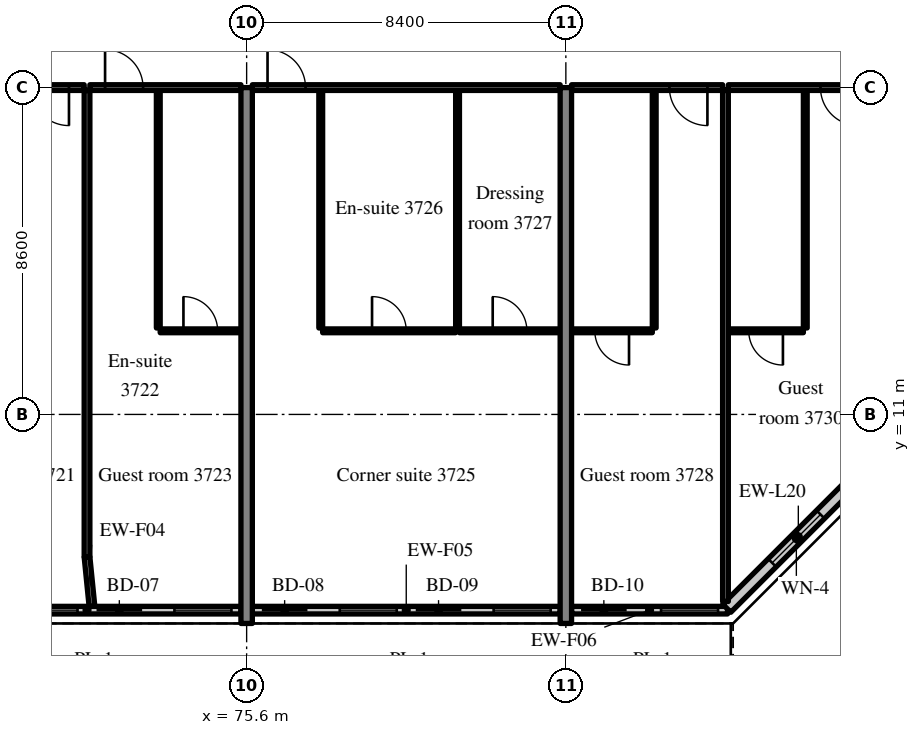
"""IFC4 building model, lengths in metres.
Left out: names, types, materials, properties, quantities, classifications, styles, units other than length and angle.
Written with IfcOpenShell. Run it as: python <this file> out.ifc"""

import sys

from ifc_helpers import new_model, si_unit, direction, frame, frame_2d, origin, place, context, subcontext, project, spatial, rectangle, extrude, source, transform, mapped, element, fill, save


model = new_model("IFC4")
c1 = context("Model", 3, precision=1e-05, world=origin(), true_north=direction((0.0, 1.0)))
c2 = subcontext(c1, "Body", "Model", "MODEL_VIEW")
j1 = project(units=[si_unit("LENGTHUNIT", "METRE"), si_unit("PLANEANGLEUNIT", "RADIAN")], contexts=[c1])
p1 = place(None, origin())
s1 = spatial("IfcSite", under=j1, at=p1, CompositionType="ELEMENT")
p2 = place(p1, origin())
s2 = spatial("IfcBuilding", under=s1, at=p2, CompositionType="ELEMENT")
p3 = place(p2, frame((0.0, 0.0, 155.4)))
s3 = spatial("IfcBuildingStorey", under=s2, at=p3, CompositionType="ELEMENT", Elevation=155.4)
m1 = source(origin(), c2, "Body", "SweptSolid", [
    extrude(rectangle(XDim=14.1, YDim=0.3, at=frame_2d((7.05, 0.0))), origin(), (0.0, 0.0, 1.0), 3.52),
])
for number, where, z_axis, x_axis in (
    (1, (75.6, 5.5, 0.0), (0.0, 0.0, 1.0), (0.0, 1.0, 0.0)),
    (2, (84.0, 5.5, 0.0), (0.0, 0.0, 1.0), (0.0, 1.0, 0.0)),
):
    element("IfcWall", number, at=place(p3, frame(where, z_axis=z_axis, x_axis=x_axis)), inside=s3, PredefinedType="SHEAR", context=c2, shape_type="MappedRepresentation", body=[
        mapped(m1, transform((0.0, 0.0, 0.0), scale=1.0)),
    ])
m2 = source(origin(), c2, "Body", "SweptSolid", [
    extrude(rectangle(XDim=8.1, YDim=0.2, at=frame_2d((4.05, 0.0))), origin(), (0.0, 0.0, 1.0), 2.87),
])
p4 = place(p3, frame((67.35, 5.85, 0.0), z_axis=(0.0, 0.0, 1.0), x_axis=(1.0, 0.0, 0.0)))
e3 = element("IfcWall", 3, at=p4, inside=s3, PredefinedType="SOLIDWALL", context=c2, shape_type="MappedRepresentation", body=[
    mapped(m2, transform((0.0, 0.0, 0.0), scale=1.0)),
])
m3 = source(origin(), c2, "Body", "SweptSolid", [
    extrude(rectangle(XDim=1.2, YDim=2.4, at=frame_2d((0.6, 1.2))), frame((0.0, 0.11, 0.0), z_axis=(0.0, -1.0, 0.0), x_axis=(1.0, 0.0, 0.0)), (0.0, 0.0, 1.0), 0.22),
])
p5 = place(p4, frame((0.25, 0.0, 0.0)))
e4 = element("IfcOpeningElement", 4, at=p5, cuts=e3, PredefinedType="OPENING", context=c2, shape_type="MappedRepresentation", body=[
    mapped(m3, transform((0.0, 0.0, 0.0), scale=1.0)),
])
m4 = source(origin(), c2, "Body", "SweptSolid", [
    extrude(rectangle(XDim=1.5, YDim=1.5, at=frame_2d((0.75, 0.75))), frame((0.0, 0.11, 0.0), z_axis=(0.0, -1.0, 0.0), x_axis=(1.0, 0.0, 0.0)), (0.0, 0.0, 1.0), 0.22),
])
p6 = place(p4, frame((2.3, 0.0, 0.9)))
e5 = element("IfcOpeningElement", 5, at=p6, cuts=e3, PredefinedType="OPENING", context=c2, shape_type="MappedRepresentation", body=[
    mapped(m4, transform((0.0, 0.0, 0.0), scale=1.0)),
])
p7 = place(p4, frame((4.3, 0.0, 0.0)))
e6 = element("IfcOpeningElement", 6, at=p7, cuts=e3, PredefinedType="OPENING", context=c2, shape_type="MappedRepresentation", body=[
    mapped(m3, transform((0.0, 0.0, 0.0), scale=1.0)),
])
p8 = place(p4, frame((6.35, 0.0, 0.9)))
e7 = element("IfcOpeningElement", 7, at=p8, cuts=e3, PredefinedType="OPENING", context=c2, shape_type="MappedRepresentation", body=[
    mapped(m4, transform((0.0, 0.0, 0.0), scale=1.0)),
])
m5 = source(origin(), c2, "Body", "SweptSolid", [
    extrude(rectangle(XDim=8.1, YDim=0.2, at=frame_2d((4.05, 0.0))), origin(), (0.0, 0.0, 1.0), 2.87),
])
p9 = place(p3, frame((75.75, 5.85, 0.0), z_axis=(0.0, 0.0, 1.0), x_axis=(1.0, 0.0, 0.0)))
e8 = element("IfcWall", 8, at=p9, inside=s3, PredefinedType="SOLIDWALL", context=c2, shape_type="MappedRepresentation", body=[
    mapped(m5, transform((0.0, 0.0, 0.0), scale=1.0)),
])
p10 = place(p9, frame((0.25, 0.0, 0.0)))
e9 = element("IfcOpeningElement", 9, at=p10, cuts=e8, PredefinedType="OPENING", context=c2, shape_type="MappedRepresentation", body=[
    mapped(m3, transform((0.0, 0.0, 0.0), scale=1.0)),
])
p11 = place(p9, frame((2.3, 0.0, 0.9)))
e10 = element("IfcOpeningElement", 10, at=p11, cuts=e8, PredefinedType="OPENING", context=c2, shape_type="MappedRepresentation", body=[
    mapped(m4, transform((0.0, 0.0, 0.0), scale=1.0)),
])
p12 = place(p9, frame((4.3, 0.0, 0.0)))
e11 = element("IfcOpeningElement", 11, at=p12, cuts=e8, PredefinedType="OPENING", context=c2, shape_type="MappedRepresentation", body=[
    mapped(m3, transform((0.0, 0.0, 0.0), scale=1.0)),
])
p13 = place(p9, frame((6.35, 0.0, 0.9)))
e12 = element("IfcOpeningElement", 12, at=p13, cuts=e8, PredefinedType="OPENING", context=c2, shape_type="MappedRepresentation", body=[
    mapped(m4, transform((0.0, 0.0, 0.0), scale=1.0)),
])
m6 = source(origin(), c2, "Body", "SweptSolid", [
    extrude(rectangle(XDim=4.105, YDim=0.2, at=frame_2d((2.052, 0.0))), origin(), (0.0, 0.0, 1.0), 2.87),
])
p14 = place(p3, frame((84.15, 5.85, 0.0), z_axis=(0.0, 0.0, 1.0), x_axis=(1.0, 0.0, 0.0)))
e13 = element("IfcWall", 13, at=p14, inside=s3, PredefinedType="SOLIDWALL", context=c2, shape_type="MappedRepresentation", body=[
    mapped(m6, transform((0.0, 0.0, 0.0), scale=1.0)),
])
p15 = place(p14, frame((0.25, 0.0, 0.0)))
e14 = element("IfcOpeningElement", 14, at=p15, cuts=e13, PredefinedType="OPENING", context=c2, shape_type="MappedRepresentation", body=[
    mapped(m3, transform((0.0, 0.0, 0.0), scale=1.0)),
])
p16 = place(p14, frame((2.355, 0.0, 0.9)))
e15 = element("IfcOpeningElement", 15, at=p16, cuts=e13, PredefinedType="OPENING", context=c2, shape_type="MappedRepresentation", body=[
    mapped(m4, transform((0.0, 0.0, 0.0), scale=1.0)),
])
m7 = source(origin(), c2, "Body", "SweptSolid", [
    extrude(rectangle(XDim=5.326, YDim=0.3, at=frame_2d((2.663, 0.0))), origin(), (0.0, 0.0, 1.0), 3.52),
])
p17 = place(p3, frame((88.234, 5.9, 0.0), z_axis=(0.0, 0.0, 1.0), x_axis=(0.707083859269, 0.707129702361, 0.0)))
e16 = element("IfcWall", 16, at=p17, inside=s3, PredefinedType="SOLIDWALL", context=c2, shape_type="MappedRepresentation", body=[
    mapped(m7, transform((0.0, 0.0, 0.0), scale=1.0)),
])
m8 = source(origin(), c2, "Body", "SweptSolid", [
    extrude(rectangle(XDim=1.8, YDim=1.5, at=frame_2d((0.9, 0.75))), frame((0.0, 0.16, 0.0), z_axis=(0.0, -1.0, 0.0), x_axis=(1.0, 0.0, 0.0)), (0.0, 0.0, 1.0), 0.32),
])
p18 = place(p17, frame((1.689, 0.0, 0.9)))
e17 = element("IfcOpeningElement", 17, at=p18, cuts=e16, PredefinedType="OPENING", context=c2, shape_type="MappedRepresentation", body=[
    mapped(m8, transform((0.0, 0.0, 0.0), scale=1.0)),
])
m9 = source(origin(), c2, "Body", "SweptSolid", [
    extrude(rectangle(XDim=3.975, YDim=0.15, at=frame_2d((1.987, 0.0))), origin(), (0.0, 0.0, 1.0), 2.82),
])
p19 = place(p3, frame((67.35, 19.6, 0.0), z_axis=(0.0, 0.0, 1.0), x_axis=(1.0, 0.0, 0.0)))
e18 = element("IfcWall", 18, at=p19, inside=s3, PredefinedType="PARTITIONING", context=c2, shape_type="MappedRepresentation", body=[
    mapped(m9, transform((0.0, 0.0, 0.0), scale=1.0)),
])
m10 = source(origin(), c2, "Body", "SweptSolid", [
    extrude(rectangle(XDim=1.0, YDim=2.1, at=frame_2d((0.5, 1.05))), frame((0.0, 0.085, 0.0), z_axis=(0.0, -1.0, 0.0), x_axis=(1.0, 0.0, 0.0)), (0.0, 0.0, 1.0), 0.17),
])
p20 = place(p19, frame((2.575, 0.0, 0.0)))
e19 = element("IfcOpeningElement", 19, at=p20, cuts=e18, PredefinedType="OPENING", context=c2, shape_type="MappedRepresentation", body=[
    mapped(m10, transform((0.0, 0.0, 0.0), scale=1.0)),
])
m11 = source(origin(), c2, "Body", "SweptSolid", [
    extrude(rectangle(XDim=6.25, YDim=0.1, at=frame_2d((3.125, 0.0))), origin(), (0.0, 0.0, 1.0), 3.52),
])
p21 = place(p3, frame((73.275, 13.275, 0.0), z_axis=(0.0, 0.0, 1.0), x_axis=(0.0, 1.0, 0.0)))
e20 = element("IfcWall", 20, at=p21, inside=s3, PredefinedType="PARTITIONING", context=c2, shape_type="MappedRepresentation", body=[
    mapped(m11, transform((0.0, 0.0, 0.0), scale=1.0)),
])
m12 = source(origin(), c2, "Body", "SweptSolid", [
    extrude(rectangle(XDim=2.125, YDim=0.1, at=frame_2d((1.062, 0.0))), origin(), (0.0, 0.0, 1.0), 3.52),
])
p22 = place(p3, frame((73.325, 13.2, 0.0), z_axis=(0.0, 0.0, 1.0), x_axis=(1.0, 0.0, 0.0)))
e21 = element("IfcWall", 21, at=p22, inside=s3, PredefinedType="PARTITIONING", context=c2, shape_type="MappedRepresentation", body=[
    mapped(m12, transform((0.0, 0.0, 0.0), scale=1.0)),
])
m13 = source(origin(), c2, "Body", "SweptSolid", [
    extrude(rectangle(XDim=0.9, YDim=2.1, at=frame_2d((0.45, 1.05))), frame((0.0, 0.06, 0.0), z_axis=(0.0, -1.0, 0.0), x_axis=(1.0, 0.0, 0.0)), (0.0, 0.0, 1.0), 0.12),
])
p23 = place(p22, frame((0.612, 0.0, 0.0)))
e22 = element("IfcOpeningElement", 22, at=p23, cuts=e21, PredefinedType="OPENING", context=c2, shape_type="MappedRepresentation", body=[
    mapped(m13, transform((0.0, 0.0, 0.0), scale=1.0)),
])
p24 = place(p3, frame((71.475, 19.6, 0.0), z_axis=(0.0, 0.0, 1.0), x_axis=(1.0, 0.0, 0.0)))
e23 = element("IfcWall", 23, at=p24, inside=s3, PredefinedType="PARTITIONING", context=c2, shape_type="MappedRepresentation", body=[
    mapped(m9, transform((0.0, 0.0, 0.0), scale=1.0)),
])
p25 = place(p24, frame((0.4, 0.0, 0.0)))
e24 = element("IfcOpeningElement", 24, at=p25, cuts=e23, PredefinedType="OPENING", context=c2, shape_type="MappedRepresentation", body=[
    mapped(m10, transform((0.0, 0.0, 0.0), scale=1.0)),
])
m14 = source(origin(), c2, "Body", "SweptSolid", [
    extrude(rectangle(XDim=12.275, YDim=0.15, at=frame_2d((6.137, 0.0))), origin(), (0.0, 0.0, 1.0), 3.52),
])
p26 = place(p3, frame((71.4, 7.25, 0.0), z_axis=(0.0, 0.0, 1.0), x_axis=(0.0, 1.0, 0.0)))
e25 = element("IfcWall", 25, at=p26, inside=s3, PredefinedType="PARTITIONING", context=c2, shape_type="MappedRepresentation", body=[
    mapped(m14, transform((0.0, 0.0, 0.0), scale=1.0)),
])
for number, where, z_axis, x_axis in (
    (26, (77.55, 13.275, 0.0), (0.0, 0.0, 1.0), (0.0, 1.0, 0.0)),
    (27, (81.15, 13.275, 0.0), (0.0, 0.0, 1.0), (0.0, 1.0, 0.0)),
):
    element("IfcWall", number, at=place(p3, frame(where, z_axis=z_axis, x_axis=x_axis)), inside=s3, PredefinedType="PARTITIONING", context=c2, shape_type="MappedRepresentation", body=[
        mapped(m11, transform((0.0, 0.0, 0.0), scale=1.0)),
    ])
m15 = source(origin(), c2, "Body", "SweptSolid", [
    extrude(rectangle(XDim=3.5, YDim=0.1, at=frame_2d((1.75, 0.0))), origin(), (0.0, 0.0, 1.0), 3.52),
])
p27 = place(p3, frame((77.6, 13.2, 0.0), z_axis=(0.0, 0.0, 1.0), x_axis=(1.0, 0.0, 0.0)))
e28 = element("IfcWall", 28, at=p27, inside=s3, PredefinedType="PARTITIONING", context=c2, shape_type="MappedRepresentation", body=[
    mapped(m15, transform((0.0, 0.0, 0.0), scale=1.0)),
])
p28 = place(p27, frame((1.3, 0.0, 0.0)))
e29 = element("IfcOpeningElement", 29, at=p28, cuts=e28, PredefinedType="OPENING", context=c2, shape_type="MappedRepresentation", body=[
    mapped(m13, transform((0.0, 0.0, 0.0), scale=1.0)),
])
m16 = source(origin(), c2, "Body", "SweptSolid", [
    extrude(rectangle(XDim=2.65, YDim=0.1, at=frame_2d((1.325, 0.0))), origin(), (0.0, 0.0, 1.0), 3.52),
])
p29 = place(p3, frame((81.2, 13.2, 0.0), z_axis=(0.0, 0.0, 1.0), x_axis=(1.0, 0.0, 0.0)))
e30 = element("IfcWall", 30, at=p29, inside=s3, PredefinedType="PARTITIONING", context=c2, shape_type="MappedRepresentation", body=[
    mapped(m16, transform((0.0, 0.0, 0.0), scale=1.0)),
])
p30 = place(p29, frame((0.875, 0.0, 0.0)))
e31 = element("IfcOpeningElement", 31, at=p30, cuts=e30, PredefinedType="OPENING", context=c2, shape_type="MappedRepresentation", body=[
    mapped(m13, transform((0.0, 0.0, 0.0), scale=1.0)),
])
m17 = source(origin(), c2, "Body", "SweptSolid", [
    extrude(rectangle(XDim=8.1, YDim=0.15, at=frame_2d((4.05, 0.0))), origin(), (0.0, 0.0, 1.0), 2.82),
])
p31 = place(p3, frame((75.75, 19.6, 0.0), z_axis=(0.0, 0.0, 1.0), x_axis=(1.0, 0.0, 0.0)))
e32 = element("IfcWall", 32, at=p31, inside=s3, PredefinedType="PARTITIONING", context=c2, shape_type="MappedRepresentation", body=[
    mapped(m17, transform((0.0, 0.0, 0.0), scale=1.0)),
])
p32 = place(p31, frame((0.4, 0.0, 0.0)))
e33 = element("IfcOpeningElement", 33, at=p32, cuts=e32, PredefinedType="OPENING", context=c2, shape_type="MappedRepresentation", body=[
    mapped(m10, transform((0.0, 0.0, 0.0), scale=1.0)),
])
p33 = place(p3, frame((86.325, 13.275, 0.0), z_axis=(0.0, 0.0, 1.0), x_axis=(0.0, 1.0, 0.0)))
e34 = element("IfcWall", 34, at=p33, inside=s3, PredefinedType="PARTITIONING", context=c2, shape_type="MappedRepresentation", body=[
    mapped(m11, transform((0.0, 0.0, 0.0), scale=1.0)),
])
p34 = place(p3, frame((84.15, 13.2, 0.0), z_axis=(0.0, 0.0, 1.0), x_axis=(1.0, 0.0, 0.0)))
e35 = element("IfcWall", 35, at=p34, inside=s3, PredefinedType="PARTITIONING", context=c2, shape_type="MappedRepresentation", body=[
    mapped(m12, transform((0.0, 0.0, 0.0), scale=1.0)),
])
p35 = place(p34, frame((0.612, 0.0, 0.0)))
e36 = element("IfcOpeningElement", 36, at=p35, cuts=e35, PredefinedType="OPENING", context=c2, shape_type="MappedRepresentation", body=[
    mapped(m13, transform((0.0, 0.0, 0.0), scale=1.0)),
])
m18 = source(origin(), c2, "Body", "SweptSolid", [
    extrude(rectangle(XDim=3.975, YDim=0.15, at=frame_2d((1.988, 0.0))), origin(), (0.0, 0.0, 1.0), 2.82),
])
p36 = place(p3, frame((84.15, 19.6, 0.0), z_axis=(0.0, 0.0, 1.0), x_axis=(1.0, 0.0, 0.0)))
e37 = element("IfcWall", 37, at=p36, inside=s3, PredefinedType="PARTITIONING", context=c2, shape_type="MappedRepresentation", body=[
    mapped(m18, transform((0.0, 0.0, 0.0), scale=1.0)),
])
p37 = place(p36, frame((2.575, 0.0, 0.0)))
e38 = element("IfcOpeningElement", 38, at=p37, cuts=e37, PredefinedType="OPENING", context=c2, shape_type="MappedRepresentation", body=[
    mapped(m10, transform((0.0, 0.0, 0.0), scale=1.0)),
])
p38 = place(p3, frame((90.3, 13.275, 0.0), z_axis=(0.0, 0.0, 1.0), x_axis=(0.0, 1.0, 0.0)))
e39 = element("IfcWall", 39, at=p38, inside=s3, PredefinedType="PARTITIONING", context=c2, shape_type="MappedRepresentation", body=[
    mapped(m11, transform((0.0, 0.0, 0.0), scale=1.0)),
])
m19 = source(origin(), c2, "Body", "SweptSolid", [
    extrude(rectangle(XDim=1.975, YDim=0.1, at=frame_2d((0.988, 0.0))), origin(), (0.0, 0.0, 1.0), 3.52),
])
p39 = place(p3, frame((88.275, 13.2, 0.0), z_axis=(0.0, 0.0, 1.0), x_axis=(1.0, 0.0, 0.0)))
e40 = element("IfcWall", 40, at=p39, inside=s3, PredefinedType="PARTITIONING", context=c2, shape_type="MappedRepresentation", body=[
    mapped(m19, transform((0.0, 0.0, 0.0), scale=1.0)),
])
p40 = place(p39, frame((0.537, 0.0, 0.0)))
e41 = element("IfcOpeningElement", 41, at=p40, cuts=e40, PredefinedType="OPENING", context=c2, shape_type="MappedRepresentation", body=[
    mapped(m13, transform((0.0, 0.0, 0.0), scale=1.0)),
])
m20 = source(origin(), c2, "Body", "SweptSolid", [
    extrude(rectangle(XDim=3.825, YDim=0.15, at=frame_2d((1.913, 0.0))), origin(), (0.0, 0.0, 1.0), 2.82),
])
p41 = place(p3, frame((88.275, 19.6, 0.0), z_axis=(0.0, 0.0, 1.0), x_axis=(1.0, 0.0, 0.0)))
e42 = element("IfcWall", 42, at=p41, inside=s3, PredefinedType="PARTITIONING", context=c2, shape_type="MappedRepresentation", body=[
    mapped(m20, transform((0.0, 0.0, 0.0), scale=1.0)),
])
p42 = place(p41, frame((2.425, 0.0, 0.0)))
e43 = element("IfcOpeningElement", 43, at=p42, cuts=e42, PredefinedType="OPENING", context=c2, shape_type="MappedRepresentation", body=[
    mapped(m10, transform((0.0, 0.0, 0.0), scale=1.0)),
])
m21 = source(origin(), c2, "Body", "SweptSolid", [
    extrude(rectangle(XDim=13.447, YDim=0.15, at=frame_2d((6.724, 0.0))), origin(), (0.0, 0.0, 1.0), 3.52),
])
p43 = place(p3, frame((88.2, 6.078, 0.0), z_axis=(0.0, 0.0, 1.0), x_axis=(0.0, 1.0, 0.0)))
e44 = element("IfcWall", 44, at=p43, inside=s3, PredefinedType="PARTITIONING", context=c2, shape_type="MappedRepresentation", body=[
    mapped(m21, transform((0.0, 0.0, 0.0), scale=1.0)),
])
m22 = source(origin(), c2, "Body", "SweptSolid", [
    extrude(rectangle(XDim=1.307, YDim=0.15, at=frame_2d((0.653, 0.0))), origin(), (0.0, 0.0, 1.0), 3.52),
])
p44 = place(p3, frame((71.53, 5.95, 0.0), z_axis=(0.0, 0.0, 1.0), x_axis=(-0.099596223396, 0.99502793543, 0.0)))
e45 = element("IfcWall", 45, at=p44, inside=s3, PredefinedType="PARTITIONING", context=c2, shape_type="MappedRepresentation", body=[
    mapped(m22, transform((0.0, 0.0, 0.0), scale=1.0)),
])
m23 = source(origin(), c2, "Body", "SweptSolid", [
    extrude(rectangle(XDim=1.5, YDim=1.5, at=frame_2d((0.75, 0.75))), frame((0.0, 0.03, 0.0), z_axis=(0.0, -1.0, 0.0), x_axis=(1.0, 0.0, 0.0)), (0.0, 0.0, 1.0), 0.06),
])
p45 = place(p6, origin())
e46 = element("IfcWindow", 46, at=p45, inside=s3, PartitioningType="SINGLE_PANEL", PredefinedType="WINDOW", context=c2, shape_type="MappedRepresentation", body=[
    mapped(m23, transform((0.0, 0.0, 0.0), scale=1.0)),
])
fill(e5, e46)
m24 = source(origin(), c2, "Body", "SweptSolid", [
    extrude(rectangle(XDim=1.2, YDim=2.4, at=frame_2d((0.6, 1.2))), frame((0.0, 0.025, 0.0), z_axis=(0.0, -1.0, 0.0), x_axis=(1.0, 0.0, 0.0)), (0.0, 0.0, 1.0), 0.05),
])
p46 = place(p7, origin())
e47 = element("IfcDoor", 47, at=p46, inside=s3, OperationType="SLIDING_TO_LEFT", PredefinedType="DOOR", context=c2, shape_type="MappedRepresentation", body=[
    mapped(m24, transform((0.0, 0.0, 0.0), scale=1.0)),
])
fill(e6, e47)
p47 = place(p8, origin())
e48 = element("IfcWindow", 48, at=p47, inside=s3, PartitioningType="SINGLE_PANEL", PredefinedType="WINDOW", context=c2, shape_type="MappedRepresentation", body=[
    mapped(m23, transform((0.0, 0.0, 0.0), scale=1.0)),
])
fill(e7, e48)
p48 = place(p10, origin())
e49 = element("IfcDoor", 49, at=p48, inside=s3, OperationType="SLIDING_TO_RIGHT", PredefinedType="DOOR", context=c2, shape_type="MappedRepresentation", body=[
    mapped(m24, transform((0.0, 0.0, 0.0), scale=1.0)),
])
fill(e9, e49)
p49 = place(p11, origin())
e50 = element("IfcWindow", 50, at=p49, inside=s3, PartitioningType="SINGLE_PANEL", PredefinedType="WINDOW", context=c2, shape_type="MappedRepresentation", body=[
    mapped(m23, transform((0.0, 0.0, 0.0), scale=1.0)),
])
fill(e10, e50)
p50 = place(p12, origin())
e51 = element("IfcDoor", 51, at=p50, inside=s3, OperationType="SLIDING_TO_LEFT", PredefinedType="DOOR", context=c2, shape_type="MappedRepresentation", body=[
    mapped(m24, transform((0.0, 0.0, 0.0), scale=1.0)),
])
fill(e11, e51)
p51 = place(p13, origin())
e52 = element("IfcWindow", 52, at=p51, inside=s3, PartitioningType="SINGLE_PANEL", PredefinedType="WINDOW", context=c2, shape_type="MappedRepresentation", body=[
    mapped(m23, transform((0.0, 0.0, 0.0), scale=1.0)),
])
fill(e12, e52)
p52 = place(p15, origin())
e53 = element("IfcDoor", 53, at=p52, inside=s3, OperationType="SLIDING_TO_RIGHT", PredefinedType="DOOR", context=c2, shape_type="MappedRepresentation", body=[
    mapped(m24, transform((0.0, 0.0, 0.0), scale=1.0)),
])
fill(e14, e53)
p53 = place(p16, origin())
e54 = element("IfcWindow", 54, at=p53, inside=s3, PartitioningType="SINGLE_PANEL", PredefinedType="WINDOW", context=c2, shape_type="MappedRepresentation", body=[
    mapped(m23, transform((0.0, 0.0, 0.0), scale=1.0)),
])
fill(e15, e54)
m25 = source(origin(), c2, "Body", "SweptSolid", [
    extrude(rectangle(XDim=1.8, YDim=1.5, at=frame_2d((0.9, 0.75))), frame((0.0, 0.03, 0.0), z_axis=(0.0, -1.0, 0.0), x_axis=(1.0, 0.0, 0.0)), (0.0, 0.0, 1.0), 0.06),
])
p54 = place(p18, origin())
e55 = element("IfcWindow", 55, at=p54, inside=s3, PartitioningType="SINGLE_PANEL", PredefinedType="WINDOW", context=c2, shape_type="MappedRepresentation", body=[
    mapped(m25, transform((0.0, 0.0, 0.0), scale=1.0)),
])
fill(e17, e55)
m26 = source(origin(), c2, "Body", "SweptSolid", [
    extrude(rectangle(XDim=1.0, YDim=2.1, at=frame_2d((0.5, 1.05))), frame((0.0, 0.025, 0.0), z_axis=(0.0, -1.0, 0.0), x_axis=(1.0, 0.0, 0.0)), (0.0, 0.0, 1.0), 0.05),
])
p55 = place(p20, origin())
e56 = element("IfcDoor", 56, at=p55, inside=s3, OperationType="SINGLE_SWING_RIGHT", PredefinedType="DOOR", context=c2, shape_type="MappedRepresentation", body=[
    mapped(m26, transform((0.0, 0.0, 0.0), scale=1.0)),
])
fill(e19, e56)
m27 = source(origin(), c2, "Body", "SweptSolid", [
    extrude(rectangle(XDim=0.9, YDim=2.1, at=frame_2d((0.45, 1.05))), frame((0.0, 0.025, 0.0), z_axis=(0.0, -1.0, 0.0), x_axis=(1.0, 0.0, 0.0)), (0.0, 0.0, 1.0), 0.05),
])
p56 = place(p23, origin())
e57 = element("IfcDoor", 57, at=p56, inside=s3, OperationType="SINGLE_SWING_LEFT", PredefinedType="DOOR", context=c2, shape_type="MappedRepresentation", body=[
    mapped(m27, transform((0.0, 0.0, 0.0), scale=1.0)),
])
fill(e22, e57)
p57 = place(p25, origin())
e58 = element("IfcDoor", 58, at=p57, inside=s3, OperationType="SINGLE_SWING_LEFT", PredefinedType="DOOR", context=c2, shape_type="MappedRepresentation", body=[
    mapped(m26, transform((0.0, 0.0, 0.0), scale=1.0)),
])
fill(e24, e58)
p58 = place(p28, origin())
e59 = element("IfcDoor", 59, at=p58, inside=s3, OperationType="SINGLE_SWING_LEFT", PredefinedType="DOOR", context=c2, shape_type="MappedRepresentation", body=[
    mapped(m27, transform((0.0, 0.0, 0.0), scale=1.0)),
])
fill(e29, e59)
p59 = place(p30, origin())
e60 = element("IfcDoor", 60, at=p59, inside=s3, OperationType="SINGLE_SWING_LEFT", PredefinedType="DOOR", context=c2, shape_type="MappedRepresentation", body=[
    mapped(m27, transform((0.0, 0.0, 0.0), scale=1.0)),
])
fill(e31, e60)
p60 = place(p32, origin())
e61 = element("IfcDoor", 61, at=p60, inside=s3, OperationType="SINGLE_SWING_LEFT", PredefinedType="DOOR", context=c2, shape_type="MappedRepresentation", body=[
    mapped(m26, transform((0.0, 0.0, 0.0), scale=1.0)),
])
fill(e33, e61)
p61 = place(p35, origin())
e62 = element("IfcDoor", 62, at=p61, inside=s3, OperationType="SINGLE_SWING_RIGHT", PredefinedType="DOOR", context=c2, shape_type="MappedRepresentation", body=[
    mapped(m27, transform((0.0, 0.0, 0.0), scale=1.0)),
])
fill(e36, e62)
p62 = place(p37, origin())
e63 = element("IfcDoor", 63, at=p62, inside=s3, OperationType="SINGLE_SWING_RIGHT", PredefinedType="DOOR", context=c2, shape_type="MappedRepresentation", body=[
    mapped(m26, transform((0.0, 0.0, 0.0), scale=1.0)),
])
fill(e38, e63)
p63 = place(p40, origin())
e64 = element("IfcDoor", 64, at=p63, inside=s3, OperationType="SINGLE_SWING_RIGHT", PredefinedType="DOOR", context=c2, shape_type="MappedRepresentation", body=[
    mapped(m27, transform((0.0, 0.0, 0.0), scale=1.0)),
])
fill(e41, e64)
p64 = place(p42, origin())
e65 = element("IfcDoor", 65, at=p64, inside=s3, OperationType="SINGLE_SWING_RIGHT", PredefinedType="DOOR", context=c2, shape_type="MappedRepresentation", body=[
    mapped(m26, transform((0.0, 0.0, 0.0), scale=1.0)),
])
fill(e43, e65)
save(model, sys.argv[1])
